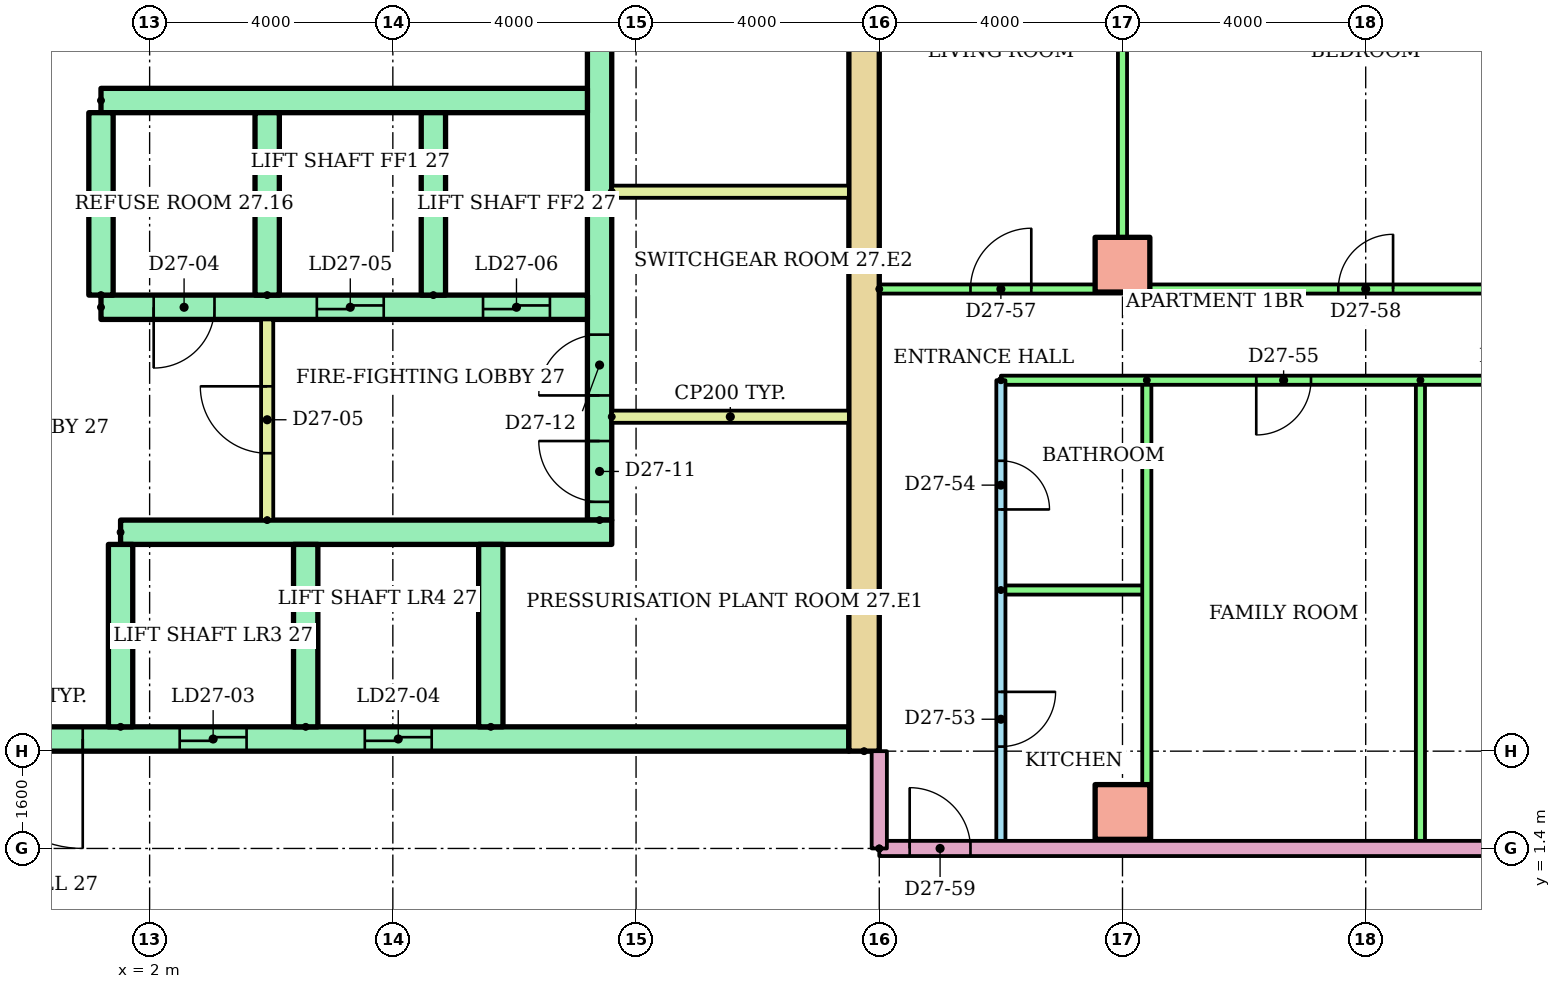
"""IFC4 building model, lengths in metres.
Left out: names, types, materials, properties, quantities, classifications, styles, units other than length and angle.
Written with IfcOpenShell. Run it as: python <this file> out.ifc"""

import sys

from ifc_helpers import new_model, si_unit, direction, frame, frame_2d, origin, origin_2d, place, context, subcontext, project, spatial, rectangle, extrude, element, fill, save


model = new_model("IFC4")
c1 = context("Model", 3, precision=1e-05, world=origin(), true_north=direction((0.0, 1.0)))
c2 = subcontext(c1, "Body", "Model", "MODEL_VIEW")
j1 = project(units=[si_unit("LENGTHUNIT", "METRE"), si_unit("PLANEANGLEUNIT", "RADIAN")], contexts=[c1])
p1 = place(None, origin())
s1 = spatial("IfcSite", under=j1, at=p1, CompositionType="ELEMENT")
p2 = place(p1, origin())
s2 = spatial("IfcBuilding", under=s1, at=p2, CompositionType="ELEMENT")
p3 = place(p2, frame((0.0, 0.0, 103.1)))
s3 = spatial("IfcBuildingStorey", under=s2, at=p3, CompositionType="ELEMENT", Elevation=103.1)
for number, where in (
    (1, (18.0, 2.0, 0.0)),
    (2, (18.0, 11.0, 0.0)),
):
    element("IfcColumn", number, at=place(p3, frame(where)), inside=s3, PredefinedType="COLUMN", context=c2, shape_type="SweptSolid", body=[
        extrude(rectangle(XDim=0.9, YDim=0.9, at=origin_2d()), origin(), (0.0, 0.0, 1.0), 3.2),
    ])
p4 = place(p3, frame((13.75, 3.0, 0.0), z_axis=(0.0, 0.0, 1.0), x_axis=(0.0, 1.0, 0.0)))
e3 = element("IfcWall", 3, at=p4, inside=s3, PredefinedType="SHEAR", context=c2, shape_type="SweptSolid", body=[
    extrude(rectangle(XDim=17.0, YDim=0.5, at=frame_2d((8.5, 0.0))), origin(), (0.0, 0.0, 1.0), 2.8),
])
p5 = place(p3, frame((9.4, 6.8, 0.0), z_axis=(0.0, 0.0, 1.0), x_axis=(0.0, 1.0, 0.0)))
e4 = element("IfcWall", 4, at=p5, inside=s3, PredefinedType="SHEAR", context=c2, shape_type="SweptSolid", body=[
    extrude(rectangle(XDim=12.7, YDim=0.4, at=frame_2d((6.35, 0.0))), origin(), (0.0, 0.0, 1.0), 2.8),
])
p6 = place(p5, frame((0.3, 0.0, 0.0)))
e5 = element("IfcOpeningElement", 5, at=p6, cuts=e4, PredefinedType="OPENING", context=c2, shape_type="SweptSolid", body=[
    extrude(rectangle(XDim=1.0, YDim=2.1, at=frame_2d((0.5, 1.05))), frame((0.0, 0.21, 0.0), z_axis=(0.0, -1.0, 0.0), x_axis=(1.0, 0.0, 0.0)), (0.0, 0.0, 1.0), 0.42),
])
p7 = place(p5, frame((2.05, 0.0, 0.0)))
e6 = element("IfcOpeningElement", 6, at=p7, cuts=e4, PredefinedType="OPENING", context=c2, shape_type="SweptSolid", body=[
    extrude(rectangle(XDim=1.0, YDim=2.1, at=frame_2d((0.5, 1.05))), frame((0.0, 0.21, 0.0), z_axis=(0.0, -1.0, 0.0), x_axis=(1.0, 0.0, 0.0)), (0.0, 0.0, 1.0), 0.42),
])
p8 = place(p5, frame((7.925, 0.0, 0.0)))
e7 = element("IfcOpeningElement", 7, at=p8, cuts=e4, PredefinedType="OPENING", context=c2, shape_type="SweptSolid", body=[
    extrude(rectangle(XDim=1.0, YDim=2.1, at=frame_2d((0.5, 1.05))), frame((0.0, 0.21, 0.0), z_axis=(0.0, -1.0, 0.0), x_axis=(1.0, 0.0, 0.0)), (0.0, 0.0, 1.0), 0.42),
])
p9 = place(p3, frame((-13.5, 3.2, 0.0)))
e8 = element("IfcWall", 8, at=p9, inside=s3, PredefinedType="SHEAR", context=c2, shape_type="SweptSolid", body=[
    extrude(rectangle(XDim=27.0, YDim=0.4, at=frame_2d((13.5, 0.0))), origin(), (0.0, 0.0, 1.0), 2.8),
])
p10 = place(p9, frame((6.861, 0.0, 0.0)))
e9 = element("IfcOpeningElement", 9, at=p10, cuts=e8, PredefinedType="OPENING", context=c2, shape_type="SweptSolid", body=[
    extrude(rectangle(XDim=1.1, YDim=2.1, at=frame_2d((0.55, 1.05))), frame((0.0, 0.21, 0.0), z_axis=(0.0, -1.0, 0.0), x_axis=(1.0, 0.0, 0.0)), (0.0, 0.0, 1.0), 0.42),
])
p11 = place(p9, frame((9.906, 0.0, 0.0)))
e10 = element("IfcOpeningElement", 10, at=p11, cuts=e8, PredefinedType="OPENING", context=c2, shape_type="SweptSolid", body=[
    extrude(rectangle(XDim=1.1, YDim=2.1, at=frame_2d((0.55, 1.05))), frame((0.0, 0.21, 0.0), z_axis=(0.0, -1.0, 0.0), x_axis=(1.0, 0.0, 0.0)), (0.0, 0.0, 1.0), 0.42),
])
p12 = place(p9, frame((15.994, 0.0, 0.0)))
e11 = element("IfcOpeningElement", 11, at=p12, cuts=e8, PredefinedType="OPENING", context=c2, shape_type="SweptSolid", body=[
    extrude(rectangle(XDim=1.1, YDim=2.1, at=frame_2d((0.55, 1.05))), frame((0.0, 0.21, 0.0), z_axis=(0.0, -1.0, 0.0), x_axis=(1.0, 0.0, 0.0)), (0.0, 0.0, 1.0), 0.42),
])
p13 = place(p9, frame((19.039, 0.0, 0.0)))
e12 = element("IfcOpeningElement", 12, at=p13, cuts=e8, PredefinedType="OPENING", context=c2, shape_type="SweptSolid", body=[
    extrude(rectangle(XDim=1.1, YDim=2.1, at=frame_2d((0.55, 1.05))), frame((0.0, 0.21, 0.0), z_axis=(0.0, -1.0, 0.0), x_axis=(1.0, 0.0, 0.0)), (0.0, 0.0, 1.0), 0.42),
])
p14 = place(p9, frame((12.6, 0.0, 0.0)))
e13 = element("IfcOpeningElement", 13, at=p14, cuts=e8, PredefinedType="OPENING", context=c2, shape_type="SweptSolid", body=[
    extrude(rectangle(XDim=1.8, YDim=2.1, at=frame_2d((0.9, 1.05))), frame((0.0, 0.21, 0.0), z_axis=(0.0, -1.0, 0.0), x_axis=(1.0, 0.0, 0.0)), (0.0, 0.0, 1.0), 0.42),
])
p15 = place(p3, frame((1.522, 6.6, 0.0)))
e14 = element("IfcWall", 14, at=p15, inside=s3, PredefinedType="SHEAR", context=c2, shape_type="SweptSolid", body=[
    extrude(rectangle(XDim=8.078, YDim=0.4, at=frame_2d((4.039, 0.0))), origin(), (0.0, 0.0, 1.0), 2.8),
])
for number, where, z_axis, x_axis in (
    (15, (1.522, 3.4, 0.0), (0.0, 0.0, 1.0), (0.0, 1.0, 0.0)),
    (16, (4.567, 3.4, 0.0), (0.0, 0.0, 1.0), (0.0, 1.0, 0.0)),
    (17, (7.611, 3.4, 0.0), (0.0, 0.0, 1.0), (0.0, 1.0, 0.0)),
):
    element("IfcWall", number, at=place(p3, frame(where, z_axis=z_axis, x_axis=x_axis)), inside=s3, PredefinedType="SHEAR", context=c2, shape_type="SweptSolid", body=[
        extrude(rectangle(XDim=3.0, YDim=0.4, at=frame_2d((1.5, 0.0))), origin(), (0.0, 0.0, 1.0), 2.8),
    ])
p16 = place(p3, frame((1.2, 10.3, 0.0)))
e18 = element("IfcWall", 18, at=p16, inside=s3, PredefinedType="SHEAR", context=c2, shape_type="SweptSolid", body=[
    extrude(rectangle(XDim=8.0, YDim=0.4, at=frame_2d((4.0, 0.0))), origin(), (0.0, 0.0, 1.0), 2.8),
])
p17 = place(p16, frame((3.55, 0.0, 0.0)))
e19 = element("IfcOpeningElement", 19, at=p17, cuts=e18, PredefinedType="OPENING", context=c2, shape_type="SweptSolid", body=[
    extrude(rectangle(XDim=1.1, YDim=2.1, at=frame_2d((0.55, 1.05))), frame((0.0, 0.21, 0.0), z_axis=(0.0, -1.0, 0.0), x_axis=(1.0, 0.0, 0.0)), (0.0, 0.0, 1.0), 0.42),
])
p18 = place(p16, frame((6.283, 0.0, 0.0)))
e20 = element("IfcOpeningElement", 20, at=p18, cuts=e18, PredefinedType="OPENING", context=c2, shape_type="SweptSolid", body=[
    extrude(rectangle(XDim=1.1, YDim=2.1, at=frame_2d((0.55, 1.05))), frame((0.0, 0.21, 0.0), z_axis=(0.0, -1.0, 0.0), x_axis=(1.0, 0.0, 0.0)), (0.0, 0.0, 1.0), 0.42),
])
p19 = place(p16, frame((0.867, 0.0, 0.0)))
e21 = element("IfcOpeningElement", 21, at=p19, cuts=e18, PredefinedType="OPENING", context=c2, shape_type="SweptSolid", body=[
    extrude(rectangle(XDim=1.0, YDim=2.1, at=frame_2d((0.5, 1.05))), frame((0.0, 0.21, 0.0), z_axis=(0.0, -1.0, 0.0), x_axis=(1.0, 0.0, 0.0)), (0.0, 0.0, 1.0), 0.42),
])
p20 = place(p3, frame((1.2, 13.7, 0.0)))
e22 = element("IfcWall", 22, at=p20, inside=s3, PredefinedType="SHEAR", context=c2, shape_type="SweptSolid", body=[
    extrude(rectangle(XDim=8.0, YDim=0.4, at=frame_2d((4.0, 0.0))), origin(), (0.0, 0.0, 1.0), 2.8),
])
for number, where, z_axis, x_axis in (
    (23, (1.2, 10.5, 0.0), (0.0, 0.0, 1.0), (0.0, 1.0, 0.0)),
    (24, (3.933, 10.5, 0.0), (0.0, 0.0, 1.0), (0.0, 1.0, 0.0)),
    (25, (6.667, 10.5, 0.0), (0.0, 0.0, 1.0), (0.0, 1.0, 0.0)),
):
    element("IfcWall", number, at=place(p3, frame(where, z_axis=z_axis, x_axis=x_axis)), inside=s3, PredefinedType="SHEAR", context=c2, shape_type="SweptSolid", body=[
        extrude(rectangle(XDim=3.0, YDim=0.4, at=frame_2d((1.5, 0.0))), origin(), (0.0, 0.0, 1.0), 2.8),
    ])
p21 = place(p3, frame((3.933, 6.8, 0.0), z_axis=(0.0, 0.0, 1.0), x_axis=(0.0, 1.0, 0.0)))
e26 = element("IfcWall", 26, at=p21, inside=s3, PredefinedType="PARTITIONING", context=c2, shape_type="SweptSolid", body=[
    extrude(rectangle(XDim=3.3, YDim=0.2, at=frame_2d((1.65, 0.0))), origin(), (0.0, 0.0, 1.0), 2.8),
])
p22 = place(p21, frame((1.1, 0.0, 0.0)))
e27 = element("IfcOpeningElement", 27, at=p22, cuts=e26, PredefinedType="OPENING", context=c2, shape_type="SweptSolid", body=[
    extrude(rectangle(XDim=1.1, YDim=2.1, at=frame_2d((0.55, 1.05))), frame((0.0, 0.11, 0.0), z_axis=(0.0, -1.0, 0.0), x_axis=(1.0, 0.0, 0.0)), (0.0, 0.0, 1.0), 0.22),
])
for number, where in (
    (28, (9.6, 8.5, 0.0)),
    (29, (9.6, 12.2, 0.0)),
):
    element("IfcWall", number, at=place(p3, frame(where)), inside=s3, PredefinedType="PARTITIONING", context=c2, shape_type="SweptSolid", body=[
        extrude(rectangle(XDim=3.9, YDim=0.2, at=frame_2d((1.95, 0.0))), origin(), (0.0, 0.0, 1.0), 2.8),
    ])
p23 = place(p3, frame((16.0, 9.1, 0.0), z_axis=(0.0, 0.0, 1.0), x_axis=(0.0, -1.0, 0.0)))
e30 = element("IfcWall", 30, at=p23, inside=s3, PredefinedType="PARTITIONING", context=c2, shape_type="SweptSolid", body=[
    extrude(rectangle(XDim=7.7, YDim=0.15, at=frame_2d((3.85, 0.0))), origin(), (0.0, 0.0, 1.0), 2.4),
])
p24 = place(p23, frame((5.125, 0.0, 0.0)))
e31 = element("IfcOpeningElement", 31, at=p24, cuts=e30, PredefinedType="OPENING", context=c2, shape_type="SweptSolid", body=[
    extrude(rectangle(XDim=0.9, YDim=2.1, at=frame_2d((0.45, 1.05))), frame((0.0, 0.085, 0.0), z_axis=(0.0, -1.0, 0.0), x_axis=(1.0, 0.0, 0.0)), (0.0, 0.0, 1.0), 0.17),
])
p25 = place(p23, frame((1.325, 0.0, 0.0)))
e32 = element("IfcOpeningElement", 32, at=p25, cuts=e30, PredefinedType="OPENING", context=c2, shape_type="SweptSolid", body=[
    extrude(rectangle(XDim=0.8, YDim=2.1, at=frame_2d((0.4, 1.05))), frame((0.0, 0.085, 0.0), z_axis=(0.0, -1.0, 0.0), x_axis=(1.0, 0.0, 0.0)), (0.0, 0.0, 1.0), 0.17),
])
p26 = place(p3, frame((16.0, 5.65, 0.0)))
e33 = element("IfcWall", 33, at=p26, inside=s3, PredefinedType="PARTITIONING", context=c2, shape_type="SweptSolid", body=[
    extrude(rectangle(XDim=2.4, YDim=0.15, at=frame_2d((1.2, 0.0))), origin(), (0.0, 0.0, 1.0), 2.4),
])
for number, where, z_axis, x_axis in (
    (34, (18.4, 9.1, 0.0), (0.0, 0.0, 1.0), (0.0, -1.0, 0.0)),
    (35, (22.9, 9.1, 0.0), (0.0, 0.0, 1.0), (0.0, -1.0, 0.0)),
):
    element("IfcWall", number, at=place(p3, frame(where, z_axis=z_axis, x_axis=x_axis)), inside=s3, PredefinedType="PARTITIONING", context=c2, shape_type="SweptSolid", body=[
        extrude(rectangle(XDim=7.7, YDim=0.15, at=frame_2d((3.85, 0.0))), origin(), (0.0, 0.0, 1.0), 2.4),
    ])
p27 = place(p3, frame((26.0, 9.1, 0.0), z_axis=(0.0, 0.0, 1.0), x_axis=(-1.0, 0.0, 0.0)))
e36 = element("IfcWall", 36, at=p27, inside=s3, PredefinedType="PARTITIONING", context=c2, shape_type="SweptSolid", body=[
    extrude(rectangle(XDim=10.0, YDim=0.15, at=frame_2d((5.0, 0.0))), origin(), (0.0, 0.0, 1.0), 2.4),
])
p28 = place(p27, frame((4.9, 0.0, 0.0)))
e37 = element("IfcOpeningElement", 37, at=p28, cuts=e36, PredefinedType="OPENING", context=c2, shape_type="SweptSolid", body=[
    extrude(rectangle(XDim=0.9, YDim=2.1, at=frame_2d((0.45, 1.05))), frame((0.0, 0.085, 0.0), z_axis=(0.0, -1.0, 0.0), x_axis=(1.0, 0.0, 0.0)), (0.0, 0.0, 1.0), 0.17),
])
p29 = place(p27, frame((1.1, 0.0, 0.0)))
e38 = element("IfcOpeningElement", 38, at=p29, cuts=e36, PredefinedType="OPENING", context=c2, shape_type="SweptSolid", body=[
    extrude(rectangle(XDim=0.9, YDim=2.1, at=frame_2d((0.45, 1.05))), frame((0.0, 0.085, 0.0), z_axis=(0.0, -1.0, 0.0), x_axis=(1.0, 0.0, 0.0)), (0.0, 0.0, 1.0), 0.17),
])
p30 = place(p3, frame((14.0, 10.6, 0.0)))
e39 = element("IfcWall", 39, at=p30, inside=s3, PredefinedType="PARTITIONING", context=c2, shape_type="SweptSolid", body=[
    extrude(rectangle(XDim=12.0, YDim=0.15, at=frame_2d((6.0, 0.0))), origin(), (0.0, 0.0, 1.0), 2.4),
])
p31 = place(p30, frame((1.5, 0.0, 0.0)))
e40 = element("IfcOpeningElement", 40, at=p31, cuts=e39, PredefinedType="OPENING", context=c2, shape_type="SweptSolid", body=[
    extrude(rectangle(XDim=1.0, YDim=2.1, at=frame_2d((0.5, 1.05))), frame((0.0, 0.085, 0.0), z_axis=(0.0, -1.0, 0.0), x_axis=(1.0, 0.0, 0.0)), (0.0, 0.0, 1.0), 0.17),
])
p32 = place(p30, frame((7.55, 0.0, 0.0)))
e41 = element("IfcOpeningElement", 41, at=p32, cuts=e39, PredefinedType="OPENING", context=c2, shape_type="SweptSolid", body=[
    extrude(rectangle(XDim=0.9, YDim=2.1, at=frame_2d((0.45, 1.05))), frame((0.0, 0.085, 0.0), z_axis=(0.0, -1.0, 0.0), x_axis=(1.0, 0.0, 0.0)), (0.0, 0.0, 1.0), 0.17),
])
p33 = place(p3, frame((18.0, 18.621, 0.0), z_axis=(0.0, 0.0, 1.0), x_axis=(0.0, -1.0, 0.0)))
e42 = element("IfcWall", 42, at=p33, inside=s3, PredefinedType="PARTITIONING", context=c2, shape_type="SweptSolid", body=[
    extrude(rectangle(XDim=8.021, YDim=0.15, at=frame_2d((4.01, 0.0))), origin(), (0.0, 0.0, 1.0), 2.4),
])
p34 = place(p3, frame((14.0, 1.4, 0.0)))
e43 = element("IfcWall", 43, at=p34, inside=s3, PredefinedType="PARTITIONING", context=c2, shape_type="SweptSolid", body=[
    extrude(rectangle(XDim=15.0, YDim=0.25, at=frame_2d((7.5, 0.0))), origin(), (0.0, 0.0, 1.0), 2.4),
])
p35 = place(p34, frame((0.5, 0.0, 0.0)))
e44 = element("IfcOpeningElement", 44, at=p35, cuts=e43, PredefinedType="OPENING", context=c2, shape_type="SweptSolid", body=[
    extrude(rectangle(XDim=1.0, YDim=2.1, at=frame_2d((0.5, 1.05))), frame((0.0, 0.135, 0.0), z_axis=(0.0, -1.0, 0.0), x_axis=(1.0, 0.0, 0.0)), (0.0, 0.0, 1.0), 0.27),
])
p36 = place(p34, frame((12.689, 0.0, 0.0)))
e45 = element("IfcOpeningElement", 45, at=p36, cuts=e43, PredefinedType="OPENING", context=c2, shape_type="SweptSolid", body=[
    extrude(rectangle(XDim=1.0, YDim=2.1, at=frame_2d((0.5, 1.05))), frame((0.0, 0.135, 0.0), z_axis=(0.0, -1.0, 0.0), x_axis=(1.0, 0.0, 0.0)), (0.0, 0.0, 1.0), 0.27),
])
p37 = place(p3, frame((14.0, 1.4, 0.0), z_axis=(0.0, 0.0, 1.0), x_axis=(0.0, 1.0, 0.0)))
e46 = element("IfcWall", 46, at=p37, inside=s3, PredefinedType="PARTITIONING", context=c2, shape_type="SweptSolid", body=[
    extrude(rectangle(XDim=1.6, YDim=0.25, at=frame_2d((0.8, 0.0))), origin(), (0.0, 0.0, 1.0), 2.4),
])
p38 = place(p12, origin())
e47 = element("IfcDoor", 47, at=p38, inside=s3, OperationType="SLIDING_TO_LEFT", PredefinedType="DOOR", context=c2, shape_type="SweptSolid", body=[
    extrude(rectangle(XDim=1.1, YDim=2.1, at=frame_2d((0.55, 1.05))), frame((0.0, 0.025, 0.0), z_axis=(0.0, -1.0, 0.0), x_axis=(1.0, 0.0, 0.0)), (0.0, 0.0, 1.0), 0.05),
])
fill(e11, e47)
p39 = place(p13, origin())
e48 = element("IfcDoor", 48, at=p39, inside=s3, OperationType="SLIDING_TO_LEFT", PredefinedType="DOOR", context=c2, shape_type="SweptSolid", body=[
    extrude(rectangle(XDim=1.1, YDim=2.1, at=frame_2d((0.55, 1.05))), frame((0.0, 0.025, 0.0), z_axis=(0.0, -1.0, 0.0), x_axis=(1.0, 0.0, 0.0)), (0.0, 0.0, 1.0), 0.05),
])
fill(e12, e48)
p40 = place(p14, frame((1.8, 0.0, 0.0), z_axis=(0.0, 0.0, 1.0), x_axis=(-1.0, 0.0, 0.0)))
e49 = element("IfcDoor", 49, at=p40, inside=s3, OperationType="DOUBLE_DOOR_SINGLE_SWING", PredefinedType="DOOR", context=c2, shape_type="SweptSolid", body=[
    extrude(rectangle(XDim=1.8, YDim=2.1, at=frame_2d((0.9, 1.05))), frame((0.0, 0.025, 0.0), z_axis=(0.0, -1.0, 0.0), x_axis=(1.0, 0.0, 0.0)), (0.0, 0.0, 1.0), 0.05),
])
fill(e13, e49)
p41 = place(p17, origin())
e50 = element("IfcDoor", 50, at=p41, inside=s3, OperationType="SLIDING_TO_LEFT", PredefinedType="DOOR", context=c2, shape_type="SweptSolid", body=[
    extrude(rectangle(XDim=1.1, YDim=2.1, at=frame_2d((0.55, 1.05))), frame((0.0, 0.025, 0.0), z_axis=(0.0, -1.0, 0.0), x_axis=(1.0, 0.0, 0.0)), (0.0, 0.0, 1.0), 0.05),
])
fill(e19, e50)
p42 = place(p18, origin())
e51 = element("IfcDoor", 51, at=p42, inside=s3, OperationType="SLIDING_TO_LEFT", PredefinedType="DOOR", context=c2, shape_type="SweptSolid", body=[
    extrude(rectangle(XDim=1.1, YDim=2.1, at=frame_2d((0.55, 1.05))), frame((0.0, 0.025, 0.0), z_axis=(0.0, -1.0, 0.0), x_axis=(1.0, 0.0, 0.0)), (0.0, 0.0, 1.0), 0.05),
])
fill(e20, e51)
p43 = place(p19, frame((1.0, 0.0, 0.0), z_axis=(0.0, 0.0, 1.0), x_axis=(-1.0, 0.0, 0.0)))
e52 = element("IfcDoor", 52, at=p43, inside=s3, OperationType="SINGLE_SWING_LEFT", PredefinedType="DOOR", context=c2, shape_type="SweptSolid", body=[
    extrude(rectangle(XDim=1.0, YDim=2.1, at=frame_2d((0.5, 1.05))), frame((0.0, 0.025, 0.0), z_axis=(0.0, -1.0, 0.0), x_axis=(1.0, 0.0, 0.0)), (0.0, 0.0, 1.0), 0.05),
])
fill(e21, e52)
p44 = place(p22, origin())
e53 = element("IfcDoor", 53, at=p44, inside=s3, OperationType="SINGLE_SWING_RIGHT", PredefinedType="DOOR", context=c2, shape_type="SweptSolid", body=[
    extrude(rectangle(XDim=1.1, YDim=2.1, at=frame_2d((0.55, 1.05))), frame((0.0, 0.025, 0.0), z_axis=(0.0, -1.0, 0.0), x_axis=(1.0, 0.0, 0.0)), (0.0, 0.0, 1.0), 0.05),
])
fill(e27, e53)
p45 = place(p6, origin())
e54 = element("IfcDoor", 54, at=p45, inside=s3, OperationType="SINGLE_SWING_RIGHT", PredefinedType="DOOR", context=c2, shape_type="SweptSolid", body=[
    extrude(rectangle(XDim=1.0, YDim=2.1, at=frame_2d((0.5, 1.05))), frame((0.0, 0.025, 0.0), z_axis=(0.0, -1.0, 0.0), x_axis=(1.0, 0.0, 0.0)), (0.0, 0.0, 1.0), 0.05),
])
fill(e5, e54)
p46 = place(p7, origin())
e55 = element("IfcDoor", 55, at=p46, inside=s3, OperationType="SINGLE_SWING_LEFT", PredefinedType="DOOR", context=c2, shape_type="SweptSolid", body=[
    extrude(rectangle(XDim=1.0, YDim=2.1, at=frame_2d((0.5, 1.05))), frame((0.0, 0.025, 0.0), z_axis=(0.0, -1.0, 0.0), x_axis=(1.0, 0.0, 0.0)), (0.0, 0.0, 1.0), 0.05),
])
fill(e6, e55)
p47 = place(p24, origin())
e56 = element("IfcDoor", 56, at=p47, inside=s3, OperationType="SINGLE_SWING_LEFT", PredefinedType="DOOR", context=c2, shape_type="SweptSolid", body=[
    extrude(rectangle(XDim=0.9, YDim=2.1, at=frame_2d((0.45, 1.05))), frame((0.0, 0.025, 0.0), z_axis=(0.0, -1.0, 0.0), x_axis=(1.0, 0.0, 0.0)), (0.0, 0.0, 1.0), 0.05),
])
fill(e31, e56)
p48 = place(p25, origin())
e57 = element("IfcDoor", 57, at=p48, inside=s3, OperationType="SINGLE_SWING_RIGHT", PredefinedType="DOOR", context=c2, shape_type="SweptSolid", body=[
    extrude(rectangle(XDim=0.8, YDim=2.1, at=frame_2d((0.4, 1.05))), frame((0.0, 0.025, 0.0), z_axis=(0.0, -1.0, 0.0), x_axis=(1.0, 0.0, 0.0)), (0.0, 0.0, 1.0), 0.05),
])
fill(e32, e57)
p49 = place(p28, origin())
e58 = element("IfcDoor", 58, at=p49, inside=s3, OperationType="SINGLE_SWING_RIGHT", PredefinedType="DOOR", context=c2, shape_type="SweptSolid", body=[
    extrude(rectangle(XDim=0.9, YDim=2.1, at=frame_2d((0.45, 1.05))), frame((0.0, 0.025, 0.0), z_axis=(0.0, -1.0, 0.0), x_axis=(1.0, 0.0, 0.0)), (0.0, 0.0, 1.0), 0.05),
])
fill(e37, e58)
p50 = place(p31, origin())
e59 = element("IfcDoor", 59, at=p50, inside=s3, OperationType="SINGLE_SWING_RIGHT", PredefinedType="DOOR", context=c2, shape_type="SweptSolid", body=[
    extrude(rectangle(XDim=1.0, YDim=2.1, at=frame_2d((0.5, 1.05))), frame((0.0, 0.025, 0.0), z_axis=(0.0, -1.0, 0.0), x_axis=(1.0, 0.0, 0.0)), (0.0, 0.0, 1.0), 0.05),
])
fill(e40, e59)
p51 = place(p32, origin())
e60 = element("IfcDoor", 60, at=p51, inside=s3, OperationType="SINGLE_SWING_RIGHT", PredefinedType="DOOR", context=c2, shape_type="SweptSolid", body=[
    extrude(rectangle(XDim=0.9, YDim=2.1, at=frame_2d((0.45, 1.05))), frame((0.0, 0.025, 0.0), z_axis=(0.0, -1.0, 0.0), x_axis=(1.0, 0.0, 0.0)), (0.0, 0.0, 1.0), 0.05),
])
fill(e41, e60)
p52 = place(p35, origin())
e61 = element("IfcDoor", 61, at=p52, inside=s3, OperationType="SINGLE_SWING_LEFT", PredefinedType="DOOR", context=c2, shape_type="SweptSolid", body=[
    extrude(rectangle(XDim=1.0, YDim=2.1, at=frame_2d((0.5, 1.05))), frame((0.0, 0.025, 0.0), z_axis=(0.0, -1.0, 0.0), x_axis=(1.0, 0.0, 0.0)), (0.0, 0.0, 1.0), 0.05),
])
fill(e44, e61)
save(model, sys.argv[1])
